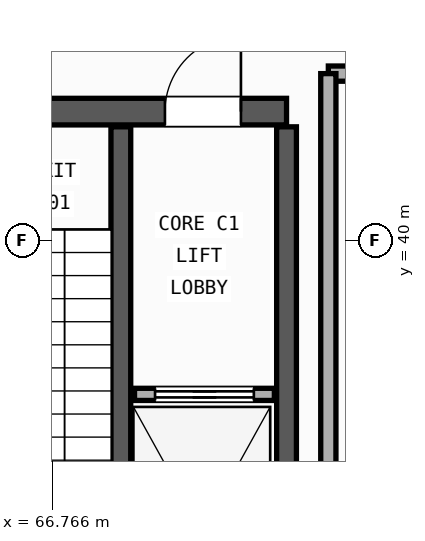
"""IFC4 building model, lengths in metres.
Left out: names, types, materials, properties, quantities, classifications, styles, units other than length and angle.
Written with IfcOpenShell. Run it as: python <this file> out.ifc"""

import sys

from ifc_helpers import new_model, si_unit, direction, frame, frame_2d, origin, place, context, subcontext, project, spatial, rectangle, extrude, element, fill, save


model = new_model("IFC4")
c1 = context("Model", 3, precision=1e-05, world=origin(), true_north=direction((0.0, 1.0)))
c2 = subcontext(c1, "Body", "Model", "MODEL_VIEW")
j1 = project(units=[si_unit("LENGTHUNIT", "METRE"), si_unit("PLANEANGLEUNIT", "RADIAN")], contexts=[c1])
p1 = place(None, origin())
s1 = spatial("IfcSite", under=j1, at=p1, CompositionType="ELEMENT")
p2 = place(p1, origin())
s2 = spatial("IfcBuilding", under=s1, at=p2, CompositionType="ELEMENT")
p3 = place(p2, frame((0.0, 0.0, 5.4)))
s3 = spatial("IfcBuildingStorey", under=s2, at=p3, CompositionType="ELEMENT", Elevation=5.4)
p4 = place(p3, frame((64.45, 41.7, 0.0), z_axis=(0.0, 0.0, 1.0), x_axis=(1.0, 0.0, 0.0)))
e1 = element("IfcWall", 1, at=p4, inside=s3, PredefinedType="SHEAR", context=c2, shape_type="SweptSolid", body=[
    extrude(rectangle(XDim=5.4, YDim=0.35, at=frame_2d((2.7, 0.0))), origin(), (0.0, 0.0, 1.0), 4.51),
])
p5 = place(p4, frame((0.95, 0.0, 0.0)))
e2 = element("IfcOpeningElement", 2, at=p5, cuts=e1, PredefinedType="OPENING", context=c2, shape_type="SweptSolid", body=[
    extrude(rectangle(XDim=1.05, YDim=2.1, at=frame_2d((0.525, 1.05))), frame((0.0, 0.185, 0.0), z_axis=(0.0, -1.0, 0.0), x_axis=(1.0, 0.0, 0.0)), (0.0, 0.0, 1.0), 0.37),
])
p6 = place(p4, frame((3.8, 0.0, 0.0)))
e3 = element("IfcOpeningElement", 3, at=p6, cuts=e1, PredefinedType="OPENING", context=c2, shape_type="SweptSolid", body=[
    extrude(rectangle(XDim=1.0, YDim=2.15, at=frame_2d((0.5, 1.075))), frame((0.0, 0.185, 0.0), z_axis=(0.0, -1.0, 0.0), x_axis=(1.0, 0.0, 0.0)), (0.0, 0.0, 1.0), 0.37),
])
for number, where, z_axis, x_axis in (
    (4, (69.85, 34.55, 0.0), (0.0, 0.0, 1.0), (0.0, 1.0, 0.0)),
    (5, (67.67, 34.55, 0.0), (0.0, 0.0, 1.0), (0.0, 1.0, 0.0)),
):
    element("IfcWall", number, at=place(p3, frame(where, z_axis=z_axis, x_axis=x_axis)), inside=s3, PredefinedType="SHEAR", context=c2, shape_type="SweptSolid", body=[
        extrude(rectangle(XDim=6.95, YDim=0.26, at=frame_2d((3.475, 0.0))), origin(), (0.0, 0.0, 1.0), 4.51),
    ])
p7 = place(p3, frame((67.85, 37.98, 0.0), z_axis=(0.0, 0.0, 1.0), x_axis=(1.0, 0.0, 0.0)))
e6 = element("IfcWall", 6, at=p7, inside=s3, PredefinedType="PARTITIONING", context=c2, shape_type="SweptSolid", body=[
    extrude(rectangle(XDim=1.84, YDim=0.16, at=frame_2d((0.92, 0.0))), origin(), (0.0, 0.0, 1.0), 3.6),
])
p8 = place(p7, frame((0.27, 0.0, 0.0)))
e7 = element("IfcOpeningElement", 7, at=p8, cuts=e6, PredefinedType="OPENING", context=c2, shape_type="SweptSolid", body=[
    extrude(rectangle(XDim=1.3, YDim=2.2, at=frame_2d((0.65, 1.1))), frame((0.0, 0.09, 0.0), z_axis=(0.0, -1.0, 0.0), x_axis=(1.0, 0.0, 0.0)), (0.0, 0.0, 1.0), 0.18),
])
p9 = place(p3, frame((70.4, 42.2, 0.0), z_axis=(0.0, 0.0, 1.0), x_axis=(1.0, 0.0, 0.0)))
e8 = element("IfcWall", 8, at=p9, inside=s3, PredefinedType="PLUMBINGWALL", context=c2, shape_type="SweptSolid", body=[
    extrude(rectangle(XDim=5.1, YDim=0.2, at=frame_2d((2.55, 0.0))), origin(), (0.0, 0.0, 1.0), 4.29),
])
p10 = place(p9, frame((2.095, 0.0, 0.0)))
e9 = element("IfcOpeningElement", 9, at=p10, cuts=e8, PredefinedType="OPENING", context=c2, shape_type="SweptSolid", body=[
    extrude(rectangle(XDim=0.91, YDim=2.1, at=frame_2d((0.455, 1.05))), frame((0.0, 0.11, 0.0), z_axis=(0.0, -1.0, 0.0), x_axis=(1.0, 0.0, 0.0)), (0.0, 0.0, 1.0), 0.22),
])
p11 = place(p3, frame((70.4, 33.5, 0.0), z_axis=(0.0, 0.0, 1.0), x_axis=(0.0, 1.0, 0.0)))
e10 = element("IfcWall", 10, at=p11, inside=s3, PredefinedType="PLUMBINGWALL", context=c2, shape_type="SweptSolid", body=[
    extrude(rectangle(XDim=8.7, YDim=0.2, at=frame_2d((4.35, 0.0))), origin(), (0.0, 0.0, 1.0), 3.872),
])
p12 = place(p8, origin())
e11 = element("IfcDoor", 11, at=p12, inside=s3, OperationType="SLIDING_TO_LEFT", PredefinedType="DOOR", context=c2, shape_type="SweptSolid", body=[
    extrude(rectangle(XDim=1.3, YDim=2.2, at=frame_2d((0.65, 1.1))), frame((0.0, 0.025, 0.0), z_axis=(0.0, -1.0, 0.0), x_axis=(1.0, 0.0, 0.0)), (0.0, 0.0, 1.0), 0.05),
])
fill(e7, e11)
p13 = place(p6, origin())
e12 = element("IfcDoor", 12, at=p13, inside=s3, OperationType="SINGLE_SWING_RIGHT", PredefinedType="DOOR", context=c2, shape_type="SweptSolid", body=[
    extrude(rectangle(XDim=1.0, YDim=2.15, at=frame_2d((0.5, 1.075))), frame((0.0, 0.025, 0.0), z_axis=(0.0, -1.0, 0.0), x_axis=(1.0, 0.0, 0.0)), (0.0, 0.0, 1.0), 0.05),
])
fill(e3, e12)
save(model, sys.argv[1])
